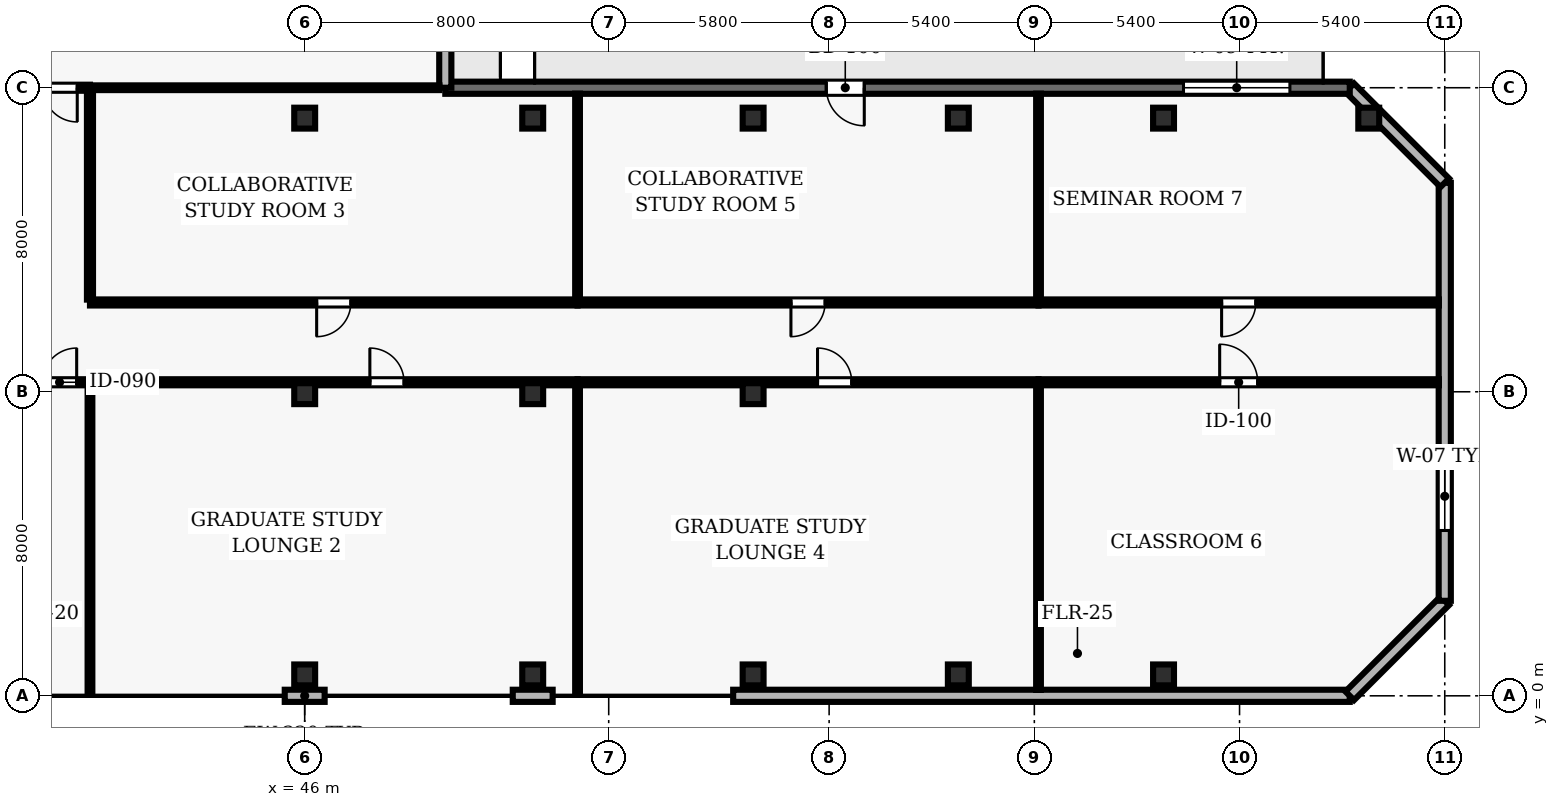
"""IFC4 building model, lengths in metres.
Left out: names, types, materials, properties, quantities, classifications, styles, units other than length and angle.
Written with IfcOpenShell. Run it as: python <this file> out.ifc"""

import sys

from ifc_helpers import new_model, si_unit, direction, frame, frame_2d, origin, origin_2d, place, context, subcontext, project, spatial, rectangle, hollow_rectangle, extrude, element, fill, save


model = new_model("IFC4")
c1 = context("Model", 3, precision=1e-05, world=origin(), true_north=direction((0.0, 1.0)))
c2 = subcontext(c1, "Body", "Model", "MODEL_VIEW")
j1 = project(units=[si_unit("LENGTHUNIT", "METRE"), si_unit("PLANEANGLEUNIT", "RADIAN")], contexts=[c1])
p1 = place(None, origin())
s1 = spatial("IfcSite", under=j1, at=p1, CompositionType="ELEMENT")
p2 = place(p1, origin())
s2 = spatial("IfcBuilding", under=s1, at=p2, CompositionType="ELEMENT")
p3 = place(p2, frame((0.0, 0.0, 70.0)))
s3 = spatial("IfcBuildingStorey", under=s2, at=p3, CompositionType="ELEMENT", Elevation=70.0)
for number, where, z_axis, x_axis in (
    (1, (46.0, 0.55, 0.0), (0.0, 0.0, 1.0), (1.0, 0.0, 0.0)),
    (2, (46.0, 7.95, 0.0), (0.0, 0.0, 1.0), (1.0, 0.0, 0.0)),
    (3, (46.0, 15.2, 0.0), (0.0, 0.0, 1.0), (1.0, 0.0, 0.0)),
    (4, (52.0, 0.55, 0.0), (0.0, 0.0, 1.0), (1.0, 0.0, 0.0)),
    (5, (52.0, 7.95, 0.0), (0.0, 0.0, 1.0), (1.0, 0.0, 0.0)),
    (6, (52.0, 15.2, 0.0), (0.0, 0.0, 1.0), (1.0, 0.0, 0.0)),
    (7, (57.8, 0.55, 0.0), (0.0, 0.0, 1.0), (1.0, 0.0, 0.0)),
    (8, (57.8, 7.95, 0.0), (0.0, 0.0, 1.0), (1.0, 0.0, 0.0)),
    (9, (57.8, 15.2, 0.0), (0.0, 0.0, 1.0), (1.0, 0.0, 0.0)),
    (10, (63.2, 0.55, 0.0), (0.0, 0.0, 1.0), (1.0, 0.0, 0.0)),
    (11, (63.2, 15.2, 0.0), (0.0, 0.0, 1.0), (1.0, 0.0, 0.0)),
    (12, (68.6, 0.55, 0.0), (0.0, 0.0, 1.0), (1.0, 0.0, 0.0)),
    (13, (68.6, 15.2, 0.0), (0.0, 0.0, 1.0), (1.0, 0.0, 0.0)),
    (14, (74.0, 15.2, 0.0), (0.0, 0.0, 1.0), (1.0, 0.0, 0.0)),
):
    element("IfcColumn", number, at=place(p3, frame(where, z_axis=z_axis, x_axis=x_axis)), inside=s3, PredefinedType="COLUMN", context=c2, shape_type="SweptSolid", body=[
        extrude(hollow_rectangle(XDim=0.55, YDim=0.55, WallThickness=0.025, at=origin_2d()), origin(), (0.0, 0.0, 1.0), 3.9),
    ])
for number, where, z_axis, x_axis in (
    (15, (45.475, 0.0, 0.0), (0.0, 0.0, 1.0), (1.0, 0.0, 0.0)),
    (16, (51.475, 0.0, 0.0), (0.0, 0.0, 1.0), (1.0, 0.0, 0.0)),
):
    element("IfcWall", number, at=place(p3, frame(where, z_axis=z_axis, x_axis=x_axis)), inside=s3, PredefinedType="SOLIDWALL", context=c2, shape_type="SweptSolid", body=[
        extrude(rectangle(XDim=1.05, YDim=0.32, at=frame_2d((0.525, 0.0))), origin(), (0.0, 0.0, 1.0), 3.69),
    ])
p4 = place(p3, frame((57.275, 0.0, 0.0), z_axis=(0.0, 0.0, 1.0), x_axis=(1.0, 0.0, 0.0)))
e17 = element("IfcWall", 17, at=p4, inside=s3, PredefinedType="SOLIDWALL", context=c2, shape_type="SweptSolid", body=[
    extrude(rectangle(XDim=16.225, YDim=0.32, at=frame_2d((8.113, 0.0))), origin(), (0.0, 0.0, 1.0), 3.69),
])
p5 = place(p3, frame((73.5, 0.0, 0.0), z_axis=(0.0, 0.0, 1.0), x_axis=(0.707106781187, 0.707106781187, 0.0)))
e18 = element("IfcWall", 18, at=p5, inside=s3, PredefinedType="SOLIDWALL", context=c2, shape_type="SweptSolid", body=[
    extrude(rectangle(XDim=3.536, YDim=0.32, at=frame_2d((1.768, 0.0))), origin(), (0.0, 0.0, 1.0), 3.69),
])
p6 = place(p3, frame((76.0, 2.5, 0.0), z_axis=(0.0, 0.0, 1.0), x_axis=(0.0, 1.0, 0.0)))
e19 = element("IfcWall", 19, at=p6, inside=s3, PredefinedType="SOLIDWALL", context=c2, shape_type="SweptSolid", body=[
    extrude(rectangle(XDim=11.0, YDim=0.32, at=frame_2d((5.5, 0.0))), origin(), (0.0, 0.0, 1.0), 3.69),
])
p7 = place(p6, frame((1.85, 0.0, 0.9)))
e20 = element("IfcOpeningElement", 20, at=p7, cuts=e19, PredefinedType="OPENING", context=c2, shape_type="SweptSolid", body=[
    extrude(rectangle(XDim=1.8, YDim=1.8, at=frame_2d((0.9, 0.9))), frame((0.0, 0.17, 0.0), z_axis=(0.0, -1.0, 0.0), x_axis=(1.0, 0.0, 0.0)), (0.0, 0.0, 1.0), 0.34),
])
p8 = place(p3, frame((76.0, 13.5, 0.0), z_axis=(0.0, 0.0, 1.0), x_axis=(-0.707106781187, 0.707106781187, 0.0)))
e21 = element("IfcWall", 21, at=p8, inside=s3, PredefinedType="SOLIDWALL", context=c2, shape_type="SweptSolid", body=[
    extrude(rectangle(XDim=3.536, YDim=0.32, at=frame_2d((1.768, 0.0))), origin(), (0.0, 0.0, 1.0), 3.69),
])
p9 = place(p3, frame((73.5, 16.0, 0.0), z_axis=(0.0, 0.0, 1.0), x_axis=(-1.0, 0.0, 0.0)))
e22 = element("IfcWall", 22, at=p9, inside=s3, PredefinedType="SOLIDWALL", context=c2, shape_type="SweptSolid", body=[
    extrude(rectangle(XDim=23.8, YDim=0.32, at=frame_2d((11.9, 0.0))), origin(), (0.0, 0.0, 1.0), 3.69),
])
p10 = place(p9, frame((12.775, 0.0, 0.0)))
e23 = element("IfcOpeningElement", 23, at=p10, cuts=e22, PredefinedType="OPENING", context=c2, shape_type="SweptSolid", body=[
    extrude(rectangle(XDim=1.0, YDim=2.2, at=frame_2d((0.5, 1.1))), frame((0.0, 0.17, 0.0), z_axis=(0.0, -1.0, 0.0), x_axis=(1.0, 0.0, 0.0)), (0.0, 0.0, 1.0), 0.34),
])
p11 = place(p9, frame((1.575, 0.0, 0.9)))
e24 = element("IfcOpeningElement", 24, at=p11, cuts=e22, PredefinedType="OPENING", context=c2, shape_type="SweptSolid", body=[
    extrude(rectangle(XDim=2.8, YDim=1.8, at=frame_2d((1.4, 0.9))), frame((0.0, 0.17, 0.0), z_axis=(0.0, -1.0, 0.0), x_axis=(1.0, 0.0, 0.0)), (0.0, 0.0, 1.0), 0.34),
])
p12 = place(p3, frame((49.7, 16.0, 0.0), z_axis=(0.0, 0.0, 1.0), x_axis=(0.0, 1.0, 0.0)))
e25 = element("IfcWall", 25, at=p12, inside=s3, PredefinedType="SOLIDWALL", context=c2, shape_type="SweptSolid", body=[
    extrude(rectangle(XDim=8.79, YDim=0.32, at=frame_2d((4.395, 0.0))), origin(), (0.0, 0.0, 1.0), 3.69),
])
p13 = place(p12, frame((3.72, 0.0, 0.0)))
e26 = element("IfcOpeningElement", 26, at=p13, cuts=e25, PredefinedType="OPENING", context=c2, shape_type="SweptSolid", body=[
    extrude(rectangle(XDim=1.35, YDim=2.2, at=frame_2d((0.675, 1.1))), frame((0.0, 0.17, 0.0), z_axis=(0.0, -1.0, 0.0), x_axis=(1.0, 0.0, 0.0)), (0.0, 0.0, 1.0), 0.34),
])
p14 = place(p3, frame((38.05, 8.25, 0.0), z_axis=(0.0, 0.0, 1.0), x_axis=(1.0, 0.0, 0.0)))
e27 = element("IfcWall", 27, at=p14, inside=s3, PredefinedType="PARTITIONING", context=c2, shape_type="SweptSolid", body=[
    extrude(rectangle(XDim=2.3, YDim=0.16, at=frame_2d((1.15, 0.0))), origin(), (0.0, 0.0, 1.0), 2.995),
])
p15 = place(p14, frame((1.05, 0.0, 0.0)))
e28 = element("IfcOpeningElement", 28, at=p15, cuts=e27, PredefinedType="OPENING", context=c2, shape_type="SweptSolid", body=[
    extrude(rectangle(XDim=0.9, YDim=2.1, at=frame_2d((0.45, 1.05))), frame((0.0, 0.09, 0.0), z_axis=(0.0, -1.0, 0.0), x_axis=(1.0, 0.0, 0.0)), (0.0, 0.0, 1.0), 0.18),
])
p16 = place(p3, frame((40.35, 8.25, 0.0), z_axis=(0.0, 0.0, 1.0), x_axis=(1.0, 0.0, 0.0)))
e29 = element("IfcWall", 29, at=p16, inside=s3, PredefinedType="PARTITIONING", context=c2, shape_type="SweptSolid", body=[
    extrude(rectangle(XDim=12.83, YDim=0.16, at=frame_2d((6.415, 0.0))), origin(), (0.0, 0.0, 1.0), 2.995),
])
p17 = place(p16, frame((7.365, 0.0, 0.0)))
e30 = element("IfcOpeningElement", 30, at=p17, cuts=e29, PredefinedType="OPENING", context=c2, shape_type="SweptSolid", body=[
    extrude(rectangle(XDim=0.9, YDim=2.1, at=frame_2d((0.45, 1.05))), frame((0.0, 0.09, 0.0), z_axis=(0.0, -1.0, 0.0), x_axis=(1.0, 0.0, 0.0)), (0.0, 0.0, 1.0), 0.18),
])
p18 = place(p3, frame((40.35, 16.0, 0.0), z_axis=(0.0, 0.0, 1.0), x_axis=(1.0, 0.0, 0.0)))
e31 = element("IfcWall", 31, at=p18, inside=s3, PredefinedType="PARTITIONING", context=c2, shape_type="SweptSolid", body=[
    extrude(rectangle(XDim=9.195, YDim=0.125, at=frame_2d((4.597, 0.0))), origin(), (0.0, 0.0, 1.0), 3.69),
])
p19 = place(p3, frame((40.35, 16.0, 0.0), z_axis=(0.0, 0.0, 1.0), x_axis=(-1.0, 0.0, 0.0)))
e32 = element("IfcWall", 32, at=p19, inside=s3, PredefinedType="PARTITIONING", context=c2, shape_type="SweptSolid", body=[
    extrude(rectangle(XDim=2.27, YDim=0.16, at=frame_2d((1.135, 0.0))), origin(), (0.0, 0.0, 1.0), 3.69),
])
p20 = place(p19, frame((0.335, 0.0, 0.0)))
e33 = element("IfcOpeningElement", 33, at=p20, cuts=e32, PredefinedType="OPENING", context=c2, shape_type="SweptSolid", body=[
    extrude(rectangle(XDim=0.9, YDim=2.1, at=frame_2d((0.45, 1.05))), frame((0.0, 0.09, 0.0), z_axis=(0.0, -1.0, 0.0), x_axis=(1.0, 0.0, 0.0)), (0.0, 0.0, 1.0), 0.18),
])
p21 = place(p3, frame((53.18, 8.25, 0.0), z_axis=(0.0, 0.0, 1.0), x_axis=(1.0, 0.0, 0.0)))
e34 = element("IfcWall", 34, at=p21, inside=s3, PredefinedType="PARTITIONING", context=c2, shape_type="SweptSolid", body=[
    extrude(rectangle(XDim=12.13, YDim=0.16, at=frame_2d((6.065, 0.0))), origin(), (0.0, 0.0, 1.0), 2.995),
])
p22 = place(p21, frame((6.315, 0.0, 0.0)))
e35 = element("IfcOpeningElement", 35, at=p22, cuts=e34, PredefinedType="OPENING", context=c2, shape_type="SweptSolid", body=[
    extrude(rectangle(XDim=0.9, YDim=2.1, at=frame_2d((0.45, 1.05))), frame((0.0, 0.09, 0.0), z_axis=(0.0, -1.0, 0.0), x_axis=(1.0, 0.0, 0.0)), (0.0, 0.0, 1.0), 0.18),
])
p23 = place(p3, frame((53.18, 10.35, 0.0), z_axis=(0.0, 0.0, 1.0), x_axis=(-1.0, 0.0, 0.0)))
e36 = element("IfcWall", 36, at=p23, inside=s3, PredefinedType="PARTITIONING", context=c2, shape_type="SweptSolid", body=[
    extrude(rectangle(XDim=12.83, YDim=0.16, at=frame_2d((6.415, 0.0))), origin(), (0.0, 0.0, 1.0), 3.227),
])
p24 = place(p23, frame((5.965, 0.0, 0.0)))
e37 = element("IfcOpeningElement", 37, at=p24, cuts=e36, PredefinedType="OPENING", context=c2, shape_type="SweptSolid", body=[
    extrude(rectangle(XDim=0.9, YDim=2.1, at=frame_2d((0.45, 1.05))), frame((0.0, 0.09, 0.0), z_axis=(0.0, -1.0, 0.0), x_axis=(1.0, 0.0, 0.0)), (0.0, 0.0, 1.0), 0.18),
])
p25 = place(p3, frame((65.31, 8.25, 0.0), z_axis=(0.0, 0.0, 1.0), x_axis=(1.0, 0.0, 0.0)))
e38 = element("IfcWall", 38, at=p25, inside=s3, PredefinedType="PARTITIONING", context=c2, shape_type="SweptSolid", body=[
    extrude(rectangle(XDim=10.535, YDim=0.16, at=frame_2d((5.268, 0.0))), origin(), (0.0, 0.0, 1.0), 3.69),
])
p26 = place(p25, frame((4.767, 0.0, 0.0)))
e39 = element("IfcOpeningElement", 39, at=p26, cuts=e38, PredefinedType="OPENING", context=c2, shape_type="SweptSolid", body=[
    extrude(rectangle(XDim=1.0, YDim=2.1, at=frame_2d((0.5, 1.05))), frame((0.0, 0.09, 0.0), z_axis=(0.0, -1.0, 0.0), x_axis=(1.0, 0.0, 0.0)), (0.0, 0.0, 1.0), 0.18),
])
p27 = place(p3, frame((65.31, 10.35, 0.0), z_axis=(0.0, 0.0, 1.0), x_axis=(-1.0, 0.0, 0.0)))
e40 = element("IfcWall", 40, at=p27, inside=s3, PredefinedType="PARTITIONING", context=c2, shape_type="SweptSolid", body=[
    extrude(rectangle(XDim=12.13, YDim=0.16, at=frame_2d((6.065, 0.0))), origin(), (0.0, 0.0, 1.0), 3.227),
])
p28 = place(p27, frame((5.615, 0.0, 0.0)))
e41 = element("IfcOpeningElement", 41, at=p28, cuts=e40, PredefinedType="OPENING", context=c2, shape_type="SweptSolid", body=[
    extrude(rectangle(XDim=0.9, YDim=2.1, at=frame_2d((0.45, 1.05))), frame((0.0, 0.09, 0.0), z_axis=(0.0, -1.0, 0.0), x_axis=(1.0, 0.0, 0.0)), (0.0, 0.0, 1.0), 0.18),
])
p29 = place(p3, frame((75.845, 10.35, 0.0), z_axis=(0.0, 0.0, 1.0), x_axis=(-1.0, 0.0, 0.0)))
e42 = element("IfcWall", 42, at=p29, inside=s3, PredefinedType="PARTITIONING", context=c2, shape_type="SweptSolid", body=[
    extrude(rectangle(XDim=10.535, YDim=0.16, at=frame_2d((5.268, 0.0))), origin(), (0.0, 0.0, 1.0), 3.227),
])
p30 = place(p29, frame((4.817, 0.0, 0.0)))
e43 = element("IfcOpeningElement", 43, at=p30, cuts=e42, PredefinedType="OPENING", context=c2, shape_type="SweptSolid", body=[
    extrude(rectangle(XDim=0.9, YDim=2.1, at=frame_2d((0.45, 1.05))), frame((0.0, 0.09, 0.0), z_axis=(0.0, -1.0, 0.0), x_axis=(1.0, 0.0, 0.0)), (0.0, 0.0, 1.0), 0.18),
])
p31 = place(p3, frame((40.35, 0.09, 0.0), z_axis=(0.0, 0.0, 1.0), x_axis=(0.0, 1.0, 0.0)))
e44 = element("IfcWall", 44, at=p31, inside=s3, PredefinedType="PARTITIONING", context=c2, shape_type="SweptSolid", body=[
    extrude(rectangle(XDim=8.085, YDim=0.125, at=frame_2d((4.042, 0.0))), origin(), (0.0, 0.0, 1.0), 3.69),
])
p32 = place(p3, frame((40.35, 10.425, 0.0), z_axis=(0.0, 0.0, 1.0), x_axis=(0.0, 1.0, 0.0)))
e45 = element("IfcWall", 45, at=p32, inside=s3, PredefinedType="PARTITIONING", context=c2, shape_type="SweptSolid", body=[
    extrude(rectangle(XDim=5.5, YDim=0.16, at=frame_2d((2.75, 0.0))), origin(), (0.0, 0.0, 1.0), 3.227),
])
p33 = place(p3, frame((53.18, 0.09, 0.0), z_axis=(0.0, 0.0, 1.0), x_axis=(0.0, 1.0, 0.0)))
e46 = element("IfcWall", 46, at=p33, inside=s3, PredefinedType="PARTITIONING", context=c2, shape_type="SweptSolid", body=[
    extrude(rectangle(XDim=8.085, YDim=0.125, at=frame_2d((4.042, 0.0))), origin(), (0.0, 0.0, 1.0), 3.69),
])
p34 = place(p3, frame((53.18, 10.425, 0.0), z_axis=(0.0, 0.0, 1.0), x_axis=(0.0, 1.0, 0.0)))
e47 = element("IfcWall", 47, at=p34, inside=s3, PredefinedType="PARTITIONING", context=c2, shape_type="SweptSolid", body=[
    extrude(rectangle(XDim=5.42, YDim=0.125, at=frame_2d((2.71, 0.0))), origin(), (0.0, 0.0, 1.0), 3.69),
])
p35 = place(p3, frame((65.31, 0.155, 0.0), z_axis=(0.0, 0.0, 1.0), x_axis=(0.0, 1.0, 0.0)))
e48 = element("IfcWall", 48, at=p35, inside=s3, PredefinedType="PARTITIONING", context=c2, shape_type="SweptSolid", body=[
    extrude(rectangle(XDim=8.02, YDim=0.125, at=frame_2d((4.01, 0.0))), origin(), (0.0, 0.0, 1.0), 3.69),
])
p36 = place(p3, frame((65.31, 10.425, 0.0), z_axis=(0.0, 0.0, 1.0), x_axis=(0.0, 1.0, 0.0)))
e49 = element("IfcWall", 49, at=p36, inside=s3, PredefinedType="PARTITIONING", context=c2, shape_type="SweptSolid", body=[
    extrude(rectangle(XDim=5.42, YDim=0.125, at=frame_2d((2.71, 0.0))), origin(), (0.0, 0.0, 1.0), 3.69),
])
p37 = place(p7, origin())
e50 = element("IfcWindow", 50, at=p37, inside=s3, PartitioningType="SINGLE_PANEL", PredefinedType="WINDOW", context=c2, shape_type="SweptSolid", body=[
    extrude(rectangle(XDim=1.8, YDim=1.8, at=frame_2d((0.9, 0.9))), frame((0.0, 0.03, 0.0), z_axis=(0.0, -1.0, 0.0), x_axis=(1.0, 0.0, 0.0)), (0.0, 0.0, 1.0), 0.06),
])
fill(e20, e50)
p38 = place(p10, origin())
e51 = element("IfcDoor", 51, at=p38, inside=s3, OperationType="SINGLE_SWING_LEFT", PredefinedType="DOOR", context=c2, shape_type="SweptSolid", body=[
    extrude(rectangle(XDim=1.0, YDim=2.2, at=frame_2d((0.5, 1.1))), frame((0.0, 0.025, 0.0), z_axis=(0.0, -1.0, 0.0), x_axis=(1.0, 0.0, 0.0)), (0.0, 0.0, 1.0), 0.05),
])
fill(e23, e51)
p39 = place(p11, origin())
e52 = element("IfcWindow", 52, at=p39, inside=s3, PartitioningType="SINGLE_PANEL", PredefinedType="WINDOW", context=c2, shape_type="SweptSolid", body=[
    extrude(rectangle(XDim=2.8, YDim=1.8, at=frame_2d((1.4, 0.9))), frame((0.0, 0.03, 0.0), z_axis=(0.0, -1.0, 0.0), x_axis=(1.0, 0.0, 0.0)), (0.0, 0.0, 1.0), 0.06),
])
fill(e24, e52)
p40 = place(p15, origin())
e53 = element("IfcDoor", 53, at=p40, inside=s3, OperationType="SINGLE_SWING_RIGHT", PredefinedType="DOOR", context=c2, shape_type="SweptSolid", body=[
    extrude(rectangle(XDim=0.9, YDim=2.1, at=frame_2d((0.45, 1.05))), frame((0.0, 0.025, 0.0), z_axis=(0.0, -1.0, 0.0), x_axis=(1.0, 0.0, 0.0)), (0.0, 0.0, 1.0), 0.05),
])
fill(e28, e53)
p41 = place(p17, origin())
e54 = element("IfcDoor", 54, at=p41, inside=s3, OperationType="SINGLE_SWING_LEFT", PredefinedType="DOOR", context=c2, shape_type="SweptSolid", body=[
    extrude(rectangle(XDim=0.9, YDim=2.1, at=frame_2d((0.45, 1.05))), frame((0.0, 0.025, 0.0), z_axis=(0.0, -1.0, 0.0), x_axis=(1.0, 0.0, 0.0)), (0.0, 0.0, 1.0), 0.05),
])
fill(e30, e54)
p42 = place(p24, origin())
e55 = element("IfcDoor", 55, at=p42, inside=s3, OperationType="SINGLE_SWING_RIGHT", PredefinedType="DOOR", context=c2, shape_type="SweptSolid", body=[
    extrude(rectangle(XDim=0.9, YDim=2.1, at=frame_2d((0.45, 1.05))), frame((0.0, 0.025, 0.0), z_axis=(0.0, -1.0, 0.0), x_axis=(1.0, 0.0, 0.0)), (0.0, 0.0, 1.0), 0.05),
])
fill(e37, e55)
p43 = place(p22, origin())
e56 = element("IfcDoor", 56, at=p43, inside=s3, OperationType="SINGLE_SWING_LEFT", PredefinedType="DOOR", context=c2, shape_type="SweptSolid", body=[
    extrude(rectangle(XDim=0.9, YDim=2.1, at=frame_2d((0.45, 1.05))), frame((0.0, 0.025, 0.0), z_axis=(0.0, -1.0, 0.0), x_axis=(1.0, 0.0, 0.0)), (0.0, 0.0, 1.0), 0.05),
])
fill(e35, e56)
p44 = place(p28, origin())
e57 = element("IfcDoor", 57, at=p44, inside=s3, OperationType="SINGLE_SWING_RIGHT", PredefinedType="DOOR", context=c2, shape_type="SweptSolid", body=[
    extrude(rectangle(XDim=0.9, YDim=2.1, at=frame_2d((0.45, 1.05))), frame((0.0, 0.025, 0.0), z_axis=(0.0, -1.0, 0.0), x_axis=(1.0, 0.0, 0.0)), (0.0, 0.0, 1.0), 0.05),
])
fill(e41, e57)
p45 = place(p26, origin())
e58 = element("IfcDoor", 58, at=p45, inside=s3, OperationType="SINGLE_SWING_LEFT", PredefinedType="DOOR", context=c2, shape_type="SweptSolid", body=[
    extrude(rectangle(XDim=1.0, YDim=2.1, at=frame_2d((0.5, 1.05))), frame((0.0, 0.025, 0.0), z_axis=(0.0, -1.0, 0.0), x_axis=(1.0, 0.0, 0.0)), (0.0, 0.0, 1.0), 0.05),
])
fill(e39, e58)
p46 = place(p30, origin())
e59 = element("IfcDoor", 59, at=p46, inside=s3, OperationType="SINGLE_SWING_RIGHT", PredefinedType="DOOR", context=c2, shape_type="SweptSolid", body=[
    extrude(rectangle(XDim=0.9, YDim=2.1, at=frame_2d((0.45, 1.05))), frame((0.0, 0.025, 0.0), z_axis=(0.0, -1.0, 0.0), x_axis=(1.0, 0.0, 0.0)), (0.0, 0.0, 1.0), 0.05),
])
fill(e43, e59)
p47 = place(p20, origin())
e60 = element("IfcDoor", 60, at=p47, inside=s3, OperationType="SINGLE_SWING_LEFT", PredefinedType="DOOR", context=c2, shape_type="SweptSolid", body=[
    extrude(rectangle(XDim=0.9, YDim=2.1, at=frame_2d((0.45, 1.05))), frame((0.0, 0.025, 0.0), z_axis=(0.0, -1.0, 0.0), x_axis=(1.0, 0.0, 0.0)), (0.0, 0.0, 1.0), 0.05),
])
fill(e33, e60)
save(model, sys.argv[1])
